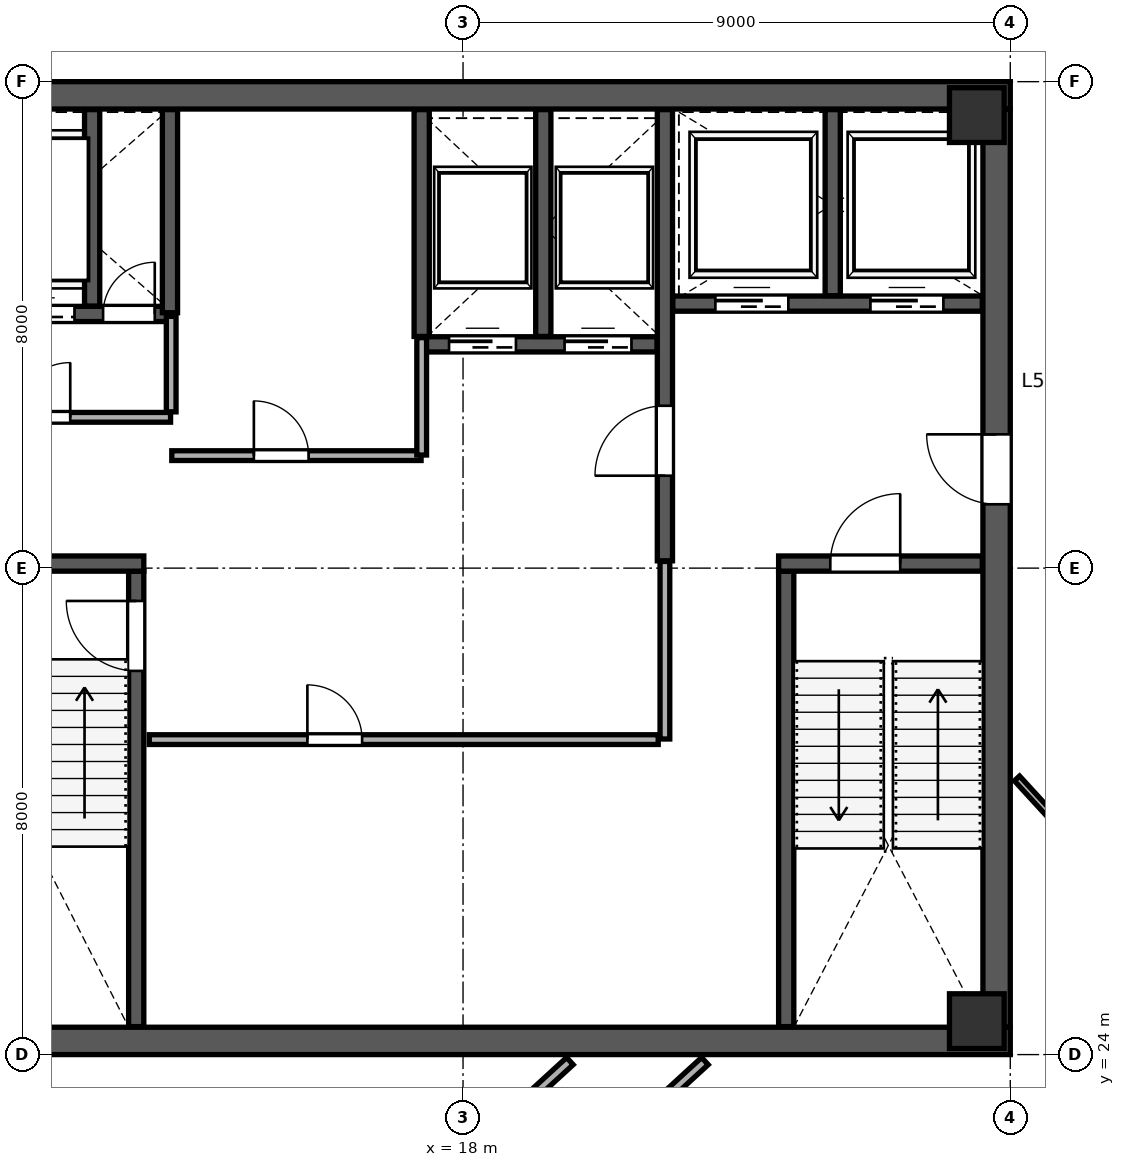
"""IFC4 building model, lengths in metres.
Left out: names, types, materials, properties, quantities, classifications, styles, units other than length and angle.
Written with IfcOpenShell. Run it as: python <this file> out.ifc"""

import sys

from ifc_helpers import new_model, si_unit, direction, frame, frame_2d, origin, origin_2d, place, context, subcontext, project, spatial, rectangle, extrude, source, transform, mapped, element, fill, save


model = new_model("IFC4")
c1 = context("Model", 3, precision=1e-05, world=origin(), true_north=direction((0.0, 1.0)))
c2 = subcontext(c1, "Body", "Model", "MODEL_VIEW")
j1 = project(units=[si_unit("LENGTHUNIT", "METRE"), si_unit("PLANEANGLEUNIT", "RADIAN")], contexts=[c1])
p1 = place(None, origin())
s1 = spatial("IfcSite", under=j1, at=p1, CompositionType="ELEMENT")
p2 = place(p1, origin())
s2 = spatial("IfcBuilding", under=s1, at=p2, CompositionType="ELEMENT")
p3 = place(p2, frame((0.0, 0.0, 254.2)))
s3 = spatial("IfcBuildingStorey", under=s2, at=p3, CompositionType="ELEMENT", Elevation=254.2)
m1 = source(origin(), c2, "Body", "SweptSolid", [
    extrude(rectangle(XDim=0.9, YDim=0.9, at=origin_2d()), origin(), (0.0, 0.0, 1.0), 4.198),
])
for number, where, z_axis, x_axis in (
    (1, (26.45, 24.55, 0.001), (0.0, 0.0, 1.0), (1.0, 0.0, 0.0)),
    (2, (26.45, 39.45, 0.001), (0.0, 0.0, 1.0), (1.0, 0.0, 0.0)),
):
    element("IfcColumn", number, at=place(p3, frame(where, z_axis=z_axis, x_axis=x_axis)), inside=s3, PredefinedType="COLUMN", context=c2, shape_type="MappedRepresentation", body=[
        mapped(m1, transform((0.0, 0.0, 0.0), scale=1.0)),
    ])
p4 = place(p3, frame((26.775, 24.45, 0.0), z_axis=(0.0, 0.0, 1.0), x_axis=(0.0, 1.0, 0.0)))
e3 = element("IfcWall", 3, at=p4, inside=s3, PredefinedType="SHEAR", context=c2, shape_type="SweptSolid", body=[
    extrude(rectangle(XDim=15.1, YDim=0.45, at=frame_2d((7.55, 0.0))), origin(), (0.0, 0.0, 1.0), 3.96),
])
p5 = place(p4, frame((8.6, 0.0, 0.0)))
e4 = element("IfcOpeningElement", 4, at=p5, cuts=e3, PredefinedType="OPENING", context=c2, shape_type="SweptSolid", body=[
    extrude(rectangle(XDim=1.15, YDim=2.2, at=frame_2d((0.575, 1.1))), frame((0.0, 0.235, 0.0), z_axis=(0.0, -1.0, 0.0), x_axis=(1.0, 0.0, 0.0)), (0.0, 0.0, 1.0), 0.47),
])
for number, where, z_axis, x_axis in (
    (5, (9.0, 24.225, 0.0), (0.0, 0.0, 1.0), (1.0, 0.0, 0.0)),
    (6, (9.0, 39.775, 0.0), (0.0, 0.0, 1.0), (1.0, 0.0, 0.0)),
):
    element("IfcWall", number, at=place(p3, frame(where, z_axis=z_axis, x_axis=x_axis)), inside=s3, PredefinedType="SHEAR", context=c2, shape_type="SweptSolid", body=[
        extrude(rectangle(XDim=18.0, YDim=0.45, at=frame_2d((9.0, 0.0))), origin(), (0.0, 0.0, 1.0), 3.96),
    ])
p6 = place(p3, frame((12.625, 24.46, 0.0), z_axis=(0.0, 0.0, 1.0), x_axis=(0.0, 1.0, 0.0)))
e7 = element("IfcWall", 7, at=p6, inside=s3, PredefinedType="SHEAR", context=c2, shape_type="SweptSolid", body=[
    extrude(rectangle(XDim=7.49, YDim=0.25, at=frame_2d((3.745, 0.0))), origin(), (0.0, 0.0, 1.0), 3.96),
])
p7 = place(p6, frame((5.85, 0.0, 0.0)))
e8 = element("IfcOpeningElement", 8, at=p7, cuts=e7, PredefinedType="OPENING", context=c2, shape_type="SweptSolid", body=[
    extrude(rectangle(XDim=1.15, YDim=2.2, at=frame_2d((0.575, 1.1))), frame((0.0, 0.135, 0.0), z_axis=(0.0, -1.0, 0.0), x_axis=(1.0, 0.0, 0.0)), (0.0, 0.0, 1.0), 0.27),
])
p8 = place(p3, frame((9.46, 32.075, 0.0), z_axis=(0.0, 0.0, 1.0), x_axis=(1.0, 0.0, 0.0)))
e9 = element("IfcWall", 9, at=p8, inside=s3, PredefinedType="SHEAR", context=c2, shape_type="SweptSolid", body=[
    extrude(rectangle(XDim=3.29, YDim=0.25, at=frame_2d((1.645, 0.0))), origin(), (0.0, 0.0, 1.0), 3.96),
])
p9 = place(p3, frame((23.315, 24.46, 0.0), z_axis=(0.0, 0.0, 1.0), x_axis=(0.0, 1.0, 0.0)))
e10 = element("IfcWall", 10, at=p9, inside=s3, PredefinedType="SHEAR", context=c2, shape_type="SweptSolid", body=[
    extrude(rectangle(XDim=7.49, YDim=0.25, at=frame_2d((3.745, 0.0))), origin(), (0.0, 0.0, 1.0), 3.96),
])
p10 = place(p3, frame((23.19, 32.075, 0.0), z_axis=(0.0, 0.0, 1.0), x_axis=(1.0, 0.0, 0.0)))
e11 = element("IfcWall", 11, at=p10, inside=s3, PredefinedType="SHEAR", context=c2, shape_type="SweptSolid", body=[
    extrude(rectangle(XDim=3.35, YDim=0.25, at=frame_2d((1.675, 0.0))), origin(), (0.0, 0.0, 1.0), 3.96),
])
p11 = place(p10, frame((0.85, 0.0, 0.0)))
e12 = element("IfcOpeningElement", 12, at=p11, cuts=e11, PredefinedType="OPENING", context=c2, shape_type="SweptSolid", body=[
    extrude(rectangle(XDim=1.15, YDim=2.2, at=frame_2d((0.575, 1.1))), frame((0.0, 0.135, 0.0), z_axis=(0.0, -1.0, 0.0), x_axis=(1.0, 0.0, 0.0)), (0.0, 0.0, 1.0), 0.27),
])
p12 = place(p3, frame((21.32, 32.12, 0.0), z_axis=(0.0, 0.0, 1.0), x_axis=(0.0, 1.0, 0.0)))
e13 = element("IfcWall", 13, at=p12, inside=s3, PredefinedType="SHEAR", context=c2, shape_type="SweptSolid", body=[
    extrude(rectangle(XDim=7.42, YDim=0.25, at=frame_2d((3.71, 0.0))), origin(), (0.0, 0.0, 1.0), 3.96),
])
p13 = place(p12, frame((1.4, 0.0, 0.0)))
e14 = element("IfcOpeningElement", 14, at=p13, cuts=e13, PredefinedType="OPENING", context=c2, shape_type="SweptSolid", body=[
    extrude(rectangle(XDim=1.15, YDim=2.2, at=frame_2d((0.575, 1.1))), frame((0.0, 0.135, 0.0), z_axis=(0.0, -1.0, 0.0), x_axis=(1.0, 0.0, 0.0)), (0.0, 0.0, 1.0), 0.27),
])
p14 = place(p3, frame((9.46, 36.18, 0.0), z_axis=(0.0, 0.0, 1.0), x_axis=(1.0, 0.0, 0.0)))
e15 = element("IfcWall", 15, at=p14, inside=s3, PredefinedType="SHEAR", context=c2, shape_type="SweptSolid", body=[
    extrude(rectangle(XDim=3.79, YDim=0.25, at=frame_2d((1.895, 0.0))), origin(), (0.0, 0.0, 1.0), 3.96),
])
p15 = place(p14, frame((2.62, 0.0, 0.0)))
e16 = element("IfcOpeningElement", 16, at=p15, cuts=e15, PredefinedType="OPENING", context=c2, shape_type="SweptSolid", body=[
    extrude(rectangle(XDim=0.85, YDim=2.1, at=frame_2d((0.425, 1.05))), frame((0.0, 0.135, 0.0), z_axis=(0.0, -1.0, 0.0), x_axis=(1.0, 0.0, 0.0)), (0.0, 0.0, 1.0), 0.27),
])
p16 = place(p14, frame((0.85, 0.0, 0.0)))
e17 = element("IfcOpeningElement", 17, at=p16, cuts=e15, PredefinedType="OPENING", context=c2, shape_type="SweptSolid", body=[
    extrude(rectangle(XDim=1.3, YDim=2.25, at=frame_2d((0.65, 1.125))), frame((0.0, 0.135, 0.0), z_axis=(0.0, -1.0, 0.0), x_axis=(1.0, 0.0, 0.0)), (0.0, 0.0, 1.0), 0.27),
])
p17 = place(p3, frame((11.9, 36.31, 0.0), z_axis=(0.0, 0.0, 1.0), x_axis=(0.0, 1.0, 0.0)))
e18 = element("IfcWall", 18, at=p17, inside=s3, PredefinedType="SHEAR", context=c2, shape_type="SweptSolid", body=[
    extrude(rectangle(XDim=3.23, YDim=0.25, at=frame_2d((1.615, 0.0))), origin(), (0.0, 0.0, 1.0), 3.96),
])
p18 = place(p3, frame((21.45, 36.35, 0.0), z_axis=(0.0, 0.0, 1.0), x_axis=(1.0, 0.0, 0.0)))
e19 = element("IfcWall", 19, at=p18, inside=s3, PredefinedType="SHEAR", context=c2, shape_type="SweptSolid", body=[
    extrude(rectangle(XDim=5.09, YDim=0.25, at=frame_2d((2.545, 0.0))), origin(), (0.0, 0.0, 1.0), 3.96),
])
p19 = place(p18, frame((0.7, 0.0, 0.0)))
e20 = element("IfcOpeningElement", 20, at=p19, cuts=e19, PredefinedType="OPENING", context=c2, shape_type="SweptSolid", body=[
    extrude(rectangle(XDim=1.2, YDim=2.2, at=frame_2d((0.6, 1.1))), frame((0.0, 0.135, 0.0), z_axis=(0.0, -1.0, 0.0), x_axis=(1.0, 0.0, 0.0)), (0.0, 0.0, 1.0), 0.27),
])
p20 = place(p18, frame((3.25, 0.0, 0.0)))
e21 = element("IfcOpeningElement", 21, at=p20, cuts=e19, PredefinedType="OPENING", context=c2, shape_type="SweptSolid", body=[
    extrude(rectangle(XDim=1.2, YDim=2.2, at=frame_2d((0.6, 1.1))), frame((0.0, 0.135, 0.0), z_axis=(0.0, -1.0, 0.0), x_axis=(1.0, 0.0, 0.0)), (0.0, 0.0, 1.0), 0.27),
])
p21 = place(p3, frame((24.08, 36.48, 0.0), z_axis=(0.0, 0.0, 1.0), x_axis=(0.0, 1.0, 0.0)))
e22 = element("IfcWall", 22, at=p21, inside=s3, PredefinedType="SHEAR", context=c2, shape_type="SweptSolid", body=[
    extrude(rectangle(XDim=3.06, YDim=0.25, at=frame_2d((1.53, 0.0))), origin(), (0.0, 0.0, 1.0), 3.96),
])
p22 = place(p3, frame((13.18, 36.2, 0.0), z_axis=(0.0, 0.0, 1.0), x_axis=(0.0, 1.0, 0.0)))
e23 = element("IfcWall", 23, at=p22, inside=s3, PredefinedType="SHEAR", context=c2, shape_type="SweptSolid", body=[
    extrude(rectangle(XDim=3.34, YDim=0.25, at=frame_2d((1.67, 0.0))), origin(), (0.0, 0.0, 1.0), 3.96),
])
p23 = place(p3, frame((17.32, 35.68, 0.0), z_axis=(0.0, 0.0, 1.0), x_axis=(1.0, 0.0, 0.0)))
e24 = element("IfcWall", 24, at=p23, inside=s3, PredefinedType="SHEAR", context=c2, shape_type="SweptSolid", body=[
    extrude(rectangle(XDim=3.87, YDim=0.25, at=frame_2d((1.935, 0.0))), origin(), (0.0, 0.0, 1.0), 3.96),
])
p24 = place(p23, frame((0.45, 0.0, 0.0)))
e25 = element("IfcOpeningElement", 25, at=p24, cuts=e24, PredefinedType="OPENING", context=c2, shape_type="SweptSolid", body=[
    extrude(rectangle(XDim=1.1, YDim=2.2, at=frame_2d((0.55, 1.1))), frame((0.0, 0.135, 0.0), z_axis=(0.0, -1.0, 0.0), x_axis=(1.0, 0.0, 0.0)), (0.0, 0.0, 1.0), 0.27),
])
p25 = place(p23, frame((2.35, 0.0, 0.0)))
e26 = element("IfcOpeningElement", 26, at=p25, cuts=e24, PredefinedType="OPENING", context=c2, shape_type="SweptSolid", body=[
    extrude(rectangle(XDim=1.1, YDim=2.2, at=frame_2d((0.55, 1.1))), frame((0.0, 0.135, 0.0), z_axis=(0.0, -1.0, 0.0), x_axis=(1.0, 0.0, 0.0)), (0.0, 0.0, 1.0), 0.27),
])
for number, where, z_axis, x_axis in (
    (27, (17.32, 35.81, 0.0), (0.0, 0.0, 1.0), (0.0, 1.0, 0.0)),
    (28, (19.32, 35.81, 0.0), (0.0, 0.0, 1.0), (0.0, 1.0, 0.0)),
):
    element("IfcWall", number, at=place(p3, frame(where, z_axis=z_axis, x_axis=x_axis)), inside=s3, PredefinedType="SHEAR", context=c2, shape_type="SweptSolid", body=[
        extrude(rectangle(XDim=3.73, YDim=0.25, at=frame_2d((1.865, 0.0))), origin(), (0.0, 0.0, 1.0), 3.96),
    ])
p26 = place(p3, frame((9.49, 34.48, 0.0), z_axis=(0.0, 0.0, 1.0), x_axis=(1.0, 0.0, 0.0)))
e29 = element("IfcWall", 29, at=p26, inside=s3, PredefinedType="PARTITIONING", context=c2, shape_type="SweptSolid", body=[
    extrude(rectangle(XDim=3.7, YDim=0.16, at=frame_2d((1.85, 0.0))), origin(), (0.0, 0.0, 1.0), 3.96),
])
p27 = place(p26, frame((1.15, 0.0, 0.0)))
e30 = element("IfcOpeningElement", 30, at=p27, cuts=e29, PredefinedType="OPENING", context=c2, shape_type="SweptSolid", body=[
    extrude(rectangle(XDim=0.9, YDim=2.15, at=frame_2d((0.45, 1.075))), frame((0.0, 0.09, 0.0), z_axis=(0.0, -1.0, 0.0), x_axis=(1.0, 0.0, 0.0)), (0.0, 0.0, 1.0), 0.18),
])
p28 = place(p3, frame((13.2, 34.57, 0.0), z_axis=(0.0, 0.0, 1.0), x_axis=(0.0, 1.0, 0.0)))
e31 = element("IfcWall", 31, at=p28, inside=s3, PredefinedType="PARTITIONING", context=c2, shape_type="SweptSolid", body=[
    extrude(rectangle(XDim=1.57, YDim=0.16, at=frame_2d((0.785, 0.0))), origin(), (0.0, 0.0, 1.0), 3.96),
])
p29 = place(p3, frame((13.21, 33.85, 0.0), z_axis=(0.0, 0.0, 1.0), x_axis=(1.0, 0.0, 0.0)))
e32 = element("IfcWall", 32, at=p29, inside=s3, PredefinedType="PARTITIONING", context=c2, shape_type="SweptSolid", body=[
    extrude(rectangle(XDim=4.1, YDim=0.16, at=frame_2d((2.05, 0.0))), origin(), (0.0, 0.0, 1.0), 3.96),
])
p30 = place(p29, frame((1.35, 0.0, 0.0)))
e33 = element("IfcOpeningElement", 33, at=p30, cuts=e32, PredefinedType="OPENING", context=c2, shape_type="SweptSolid", body=[
    extrude(rectangle(XDim=0.9, YDim=2.15, at=frame_2d((0.45, 1.075))), frame((0.0, 0.09, 0.0), z_axis=(0.0, -1.0, 0.0), x_axis=(1.0, 0.0, 0.0)), (0.0, 0.0, 1.0), 0.18),
])
p31 = place(p3, frame((17.32, 33.86, 0.0), z_axis=(0.0, 0.0, 1.0), x_axis=(0.0, 1.0, 0.0)))
e34 = element("IfcWall", 34, at=p31, inside=s3, PredefinedType="PARTITIONING", context=c2, shape_type="SweptSolid", body=[
    extrude(rectangle(XDim=1.93, YDim=0.16, at=frame_2d((0.965, 0.0))), origin(), (0.0, 0.0, 1.0), 3.96),
])
p32 = place(p3, frame((12.84, 29.18, 0.0), z_axis=(0.0, 0.0, 1.0), x_axis=(1.0, 0.0, 0.0)))
e35 = element("IfcWall", 35, at=p32, inside=s3, PredefinedType="PARTITIONING", context=c2, shape_type="SweptSolid", body=[
    extrude(rectangle(XDim=8.37, YDim=0.16, at=frame_2d((4.185, 0.0))), origin(), (0.0, 0.0, 1.0), 3.96),
])
p33 = place(p32, frame((2.6, 0.0, 0.0)))
e36 = element("IfcOpeningElement", 36, at=p33, cuts=e35, PredefinedType="OPENING", context=c2, shape_type="SweptSolid", body=[
    extrude(rectangle(XDim=0.9, YDim=2.15, at=frame_2d((0.45, 1.075))), frame((0.0, 0.09, 0.0), z_axis=(0.0, -1.0, 0.0), x_axis=(1.0, 0.0, 0.0)), (0.0, 0.0, 1.0), 0.18),
])
p34 = place(p3, frame((21.32, 29.19, 0.0), z_axis=(0.0, 0.0, 1.0), x_axis=(0.0, 1.0, 0.0)))
e37 = element("IfcWall", 37, at=p34, inside=s3, PredefinedType="PARTITIONING", context=c2, shape_type="SweptSolid", body=[
    extrude(rectangle(XDim=2.92, YDim=0.16, at=frame_2d((1.46, 0.0))), origin(), (0.0, 0.0, 1.0), 3.96),
])
p35 = place(p3, frame((4.203, 28.778, 0.0), z_axis=(0.0, 0.0, 1.0), x_axis=(0.675591041558, -0.737276572642, 0.0)))
e38 = element("IfcWall", 38, at=p35, inside=s3, PredefinedType="PARTITIONING", context=c2, shape_type="SweptSolid", body=[
    extrude(rectangle(XDim=14.07, YDim=0.16, at=frame_2d((7.035, 0.0))), origin(), (0.0, 0.0, 1.0), 3.96),
])
p36 = place(p35, frame((1.15, 0.0, 0.0)))
e39 = element("IfcOpeningElement", 39, at=p36, cuts=e38, PredefinedType="OPENING", context=c2, shape_type="SweptSolid", body=[
    extrude(rectangle(XDim=0.95, YDim=2.15, at=frame_2d((0.475, 1.075))), frame((0.0, 0.09, 0.0), z_axis=(0.0, -1.0, 0.0), x_axis=(1.0, 0.0, 0.0)), (0.0, 0.0, 1.0), 0.18),
])
p37 = place(p3, frame((13.765, 18.402, 0.0), z_axis=(0.0, 0.0, 1.0), x_axis=(0.737266340408, 0.675602207887, 0.0)))
e40 = element("IfcWall", 40, at=p37, inside=s3, PredefinedType="PARTITIONING", context=c2, shape_type="SweptSolid", body=[
    extrude(rectangle(XDim=8.128, YDim=0.16, at=frame_2d((4.064, 0.0))), origin(), (0.0, 0.0, 1.0), 3.96),
])
p38 = place(p3, frame((19.042, 50.92, 0.0), z_axis=(0.0, 0.0, 1.0), x_axis=(0.675589646996, -0.737277850523, 0.0)))
e41 = element("IfcWall", 41, at=p38, inside=s3, PredefinedType="PARTITIONING", context=c2, shape_type="SweptSolid", body=[
    extrude(rectangle(XDim=21.87, YDim=0.135, at=frame_2d((10.935, 0.0))), origin(), (0.0, 0.0, 1.0), 3.96),
])
p39 = place(p38, frame((5.4, 0.0, 0.0)))
e42 = element("IfcOpeningElement", 42, at=p39, cuts=e41, PredefinedType="OPENING", context=c2, shape_type="SweptSolid", body=[
    extrude(rectangle(XDim=0.95, YDim=2.15, at=frame_2d((0.475, 1.075))), frame((0.0, 0.078, 0.0), z_axis=(0.0, -1.0, 0.0), x_axis=(1.0, 0.0, 0.0)), (0.0, 0.0, 1.0), 0.155),
])
p40 = place(p38, frame((9.4, 0.0, 0.0)))
e43 = element("IfcOpeningElement", 43, at=p40, cuts=e41, PredefinedType="OPENING", context=c2, shape_type="SweptSolid", body=[
    extrude(rectangle(XDim=0.95, YDim=2.15, at=frame_2d((0.475, 1.075))), frame((0.0, 0.078, 0.0), z_axis=(0.0, -1.0, 0.0), x_axis=(1.0, 0.0, 0.0)), (0.0, 0.0, 1.0), 0.155),
])
p41 = place(p3, frame((1.393, 34.124, 0.0), z_axis=(0.0, 0.0, 1.0), x_axis=(0.737274323436, 0.675593496121, 0.0)))
e44 = element("IfcWall", 44, at=p41, inside=s3, PredefinedType="PARTITIONING", context=c2, shape_type="SweptSolid", body=[
    extrude(rectangle(XDim=27.402, YDim=0.135, at=frame_2d((13.701, 0.0))), origin(), (0.0, 0.0, 1.0), 3.96),
])
p42 = place(p3, frame((12.47, 15.181, 0.0), z_axis=(0.0, 0.0, 1.0), x_axis=(0.737265724175, 0.675602880365, 0.0)))
e45 = element("IfcWall", 45, at=p42, inside=s3, PredefinedType="PARTITIONING", context=c2, shape_type="SweptSolid", body=[
    extrude(rectangle(XDim=12.895, YDim=0.16, at=frame_2d((6.448, 0.0))), origin(), (0.0, 0.0, 1.0), 3.96),
])
p43 = place(p3, frame((27.11, 28.542, 0.0), z_axis=(0.0, 0.0, 1.0), x_axis=(0.675588589041, -0.737278819957, 0.0)))
e46 = element("IfcWall", 46, at=p43, inside=s3, PredefinedType="PARTITIONING", context=c2, shape_type="SweptSolid", body=[
    extrude(rectangle(XDim=17.88, YDim=0.115, at=frame_2d((8.94, 0.0))), origin(), (0.0, 0.0, 1.0), 3.252),
])
p44 = place(p43, frame((1.05, 0.0, 0.0)))
e47 = element("IfcOpeningElement", 47, at=p44, cuts=e46, PredefinedType="OPENING", context=c2, shape_type="SweptSolid", body=[
    extrude(rectangle(XDim=0.95, YDim=2.15, at=frame_2d((0.475, 1.075))), frame((0.0, 0.067, 0.0), z_axis=(0.0, -1.0, 0.0), x_axis=(1.0, 0.0, 0.0)), (0.0, 0.0, 1.0), 0.135),
])
m2 = source(origin(), c2, "Body", "SweptSolid", [
    extrude(rectangle(XDim=1.15, YDim=2.2, at=frame_2d((0.575, 1.1))), frame((0.0, 0.025, 0.0), z_axis=(0.0, -1.0, 0.0), x_axis=(1.0, 0.0, 0.0)), (0.0, 0.0, 1.0), 0.05),
])
p45 = place(p7, origin())
e48 = element("IfcDoor", 48, at=p45, inside=s3, OperationType="SINGLE_SWING_RIGHT", PredefinedType="DOOR", context=c2, shape_type="MappedRepresentation", body=[
    mapped(m2, transform((0.0, 0.0, 0.0), scale=1.0)),
])
fill(e8, e48)
m3 = source(origin(), c2, "Body", "SweptSolid", [
    extrude(rectangle(XDim=1.15, YDim=2.2, at=frame_2d((0.575, 1.1))), frame((0.0, 0.025, 0.0), z_axis=(0.0, -1.0, 0.0), x_axis=(1.0, 0.0, 0.0)), (0.0, 0.0, 1.0), 0.05),
])
p46 = place(p13, origin())
e49 = element("IfcDoor", 49, at=p46, inside=s3, OperationType="SINGLE_SWING_LEFT", PredefinedType="DOOR", context=c2, shape_type="MappedRepresentation", body=[
    mapped(m3, transform((0.0, 0.0, 0.0), scale=1.0)),
])
fill(e14, e49)
p47 = place(p11, origin())
e50 = element("IfcDoor", 50, at=p47, inside=s3, OperationType="SINGLE_SWING_RIGHT", PredefinedType="DOOR", context=c2, shape_type="MappedRepresentation", body=[
    mapped(m2, transform((0.0, 0.0, 0.0), scale=1.0)),
])
fill(e12, e50)
p48 = place(p5, origin())
e51 = element("IfcDoor", 51, at=p48, inside=s3, OperationType="SINGLE_SWING_RIGHT", PredefinedType="DOOR", context=c2, shape_type="MappedRepresentation", body=[
    mapped(m3, transform((0.0, 0.0, 0.0), scale=1.0)),
])
fill(e4, e51)
m4 = source(origin(), c2, "Body", "SweptSolid", [
    extrude(rectangle(XDim=0.85, YDim=2.1, at=frame_2d((0.425, 1.05))), frame((0.0, 0.025, 0.0), z_axis=(0.0, -1.0, 0.0), x_axis=(1.0, 0.0, 0.0)), (0.0, 0.0, 1.0), 0.05),
])
p49 = place(p15, origin())
e52 = element("IfcDoor", 52, at=p49, inside=s3, OperationType="SINGLE_SWING_RIGHT", PredefinedType="DOOR", context=c2, shape_type="MappedRepresentation", body=[
    mapped(m4, transform((0.0, 0.0, 0.0), scale=1.0)),
])
fill(e16, e52)
m5 = source(origin(), c2, "Body", "SweptSolid", [
    extrude(rectangle(XDim=1.1, YDim=2.2, at=frame_2d((0.55, 1.1))), frame((0.0, 0.025, 0.0), z_axis=(0.0, -1.0, 0.0), x_axis=(1.0, 0.0, 0.0)), (0.0, 0.0, 1.0), 0.05),
])
p50 = place(p24, origin())
e53 = element("IfcDoor", 53, at=p50, inside=s3, OperationType="SLIDING_TO_LEFT", PredefinedType="DOOR", context=c2, shape_type="MappedRepresentation", body=[
    mapped(m5, transform((0.0, 0.0, 0.0), scale=1.0)),
])
fill(e25, e53)
p51 = place(p25, origin())
e54 = element("IfcDoor", 54, at=p51, inside=s3, OperationType="SLIDING_TO_RIGHT", PredefinedType="DOOR", context=c2, shape_type="MappedRepresentation", body=[
    mapped(m5, transform((0.0, 0.0, 0.0), scale=1.0)),
])
fill(e26, e54)
m6 = source(origin(), c2, "Body", "SweptSolid", [
    extrude(rectangle(XDim=1.2, YDim=2.2, at=frame_2d((0.6, 1.1))), frame((0.0, 0.025, 0.0), z_axis=(0.0, -1.0, 0.0), x_axis=(1.0, 0.0, 0.0)), (0.0, 0.0, 1.0), 0.05),
])
p52 = place(p19, origin())
e55 = element("IfcDoor", 55, at=p52, inside=s3, OperationType="SLIDING_TO_LEFT", PredefinedType="DOOR", context=c2, shape_type="MappedRepresentation", body=[
    mapped(m6, transform((0.0, 0.0, 0.0), scale=1.0)),
])
fill(e20, e55)
p53 = place(p20, origin())
e56 = element("IfcDoor", 56, at=p53, inside=s3, OperationType="SLIDING_TO_RIGHT", PredefinedType="DOOR", context=c2, shape_type="MappedRepresentation", body=[
    mapped(m6, transform((0.0, 0.0, 0.0), scale=1.0)),
])
fill(e21, e56)
m7 = source(origin(), c2, "Body", "SweptSolid", [
    extrude(rectangle(XDim=1.3, YDim=2.25, at=frame_2d((0.65, 1.125))), frame((0.0, 0.025, 0.0), z_axis=(0.0, -1.0, 0.0), x_axis=(1.0, 0.0, 0.0)), (0.0, 0.0, 1.0), 0.05),
])
p54 = place(p16, origin())
e57 = element("IfcDoor", 57, at=p54, inside=s3, OperationType="SLIDING_TO_LEFT", PredefinedType="DOOR", context=c2, shape_type="MappedRepresentation", body=[
    mapped(m7, transform((0.0, 0.0, 0.0), scale=1.0)),
])
fill(e17, e57)
m8 = source(origin(), c2, "Body", "SweptSolid", [
    extrude(rectangle(XDim=0.9, YDim=2.15, at=frame_2d((0.45, 1.075))), frame((0.0, 0.025, 0.0), z_axis=(0.0, -1.0, 0.0), x_axis=(1.0, 0.0, 0.0)), (0.0, 0.0, 1.0), 0.05),
])
p55 = place(p27, origin())
e58 = element("IfcDoor", 58, at=p55, inside=s3, OperationType="SINGLE_SWING_RIGHT", PredefinedType="DOOR", context=c2, shape_type="MappedRepresentation", body=[
    mapped(m8, transform((0.0, 0.0, 0.0), scale=1.0)),
])
fill(e30, e58)
p56 = place(p30, origin())
e59 = element("IfcDoor", 59, at=p56, inside=s3, OperationType="SINGLE_SWING_LEFT", PredefinedType="DOOR", context=c2, shape_type="MappedRepresentation", body=[
    mapped(m8, transform((0.0, 0.0, 0.0), scale=1.0)),
])
fill(e33, e59)
p57 = place(p33, origin())
e60 = element("IfcDoor", 60, at=p57, inside=s3, OperationType="SINGLE_SWING_LEFT", PredefinedType="DOOR", context=c2, shape_type="MappedRepresentation", body=[
    mapped(m8, transform((0.0, 0.0, 0.0), scale=1.0)),
])
fill(e36, e60)
save(model, sys.argv[1])
